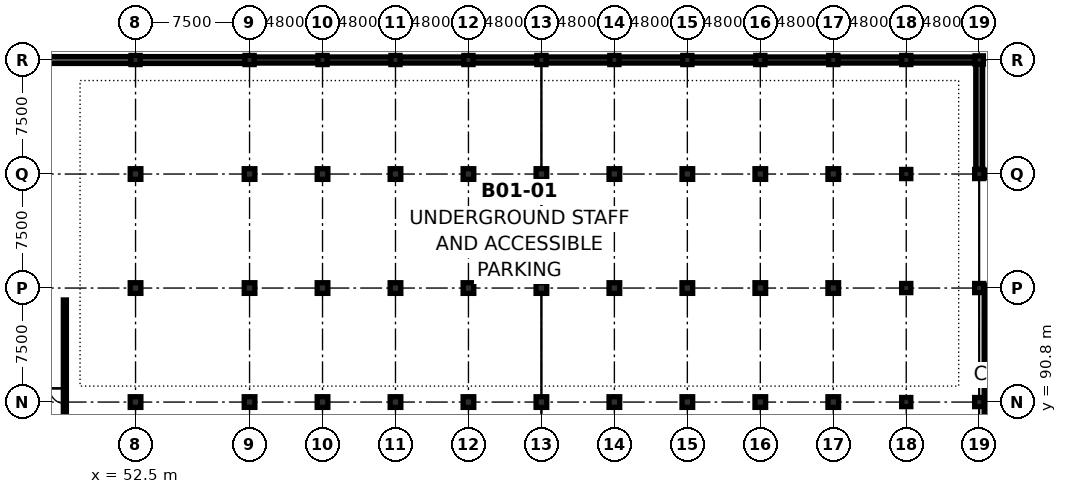
"""IFC4 building model, lengths in metres.
Left out: names, types, materials, properties, quantities, classifications, styles, units other than length and angle.
Written with IfcOpenShell. Run it as: python <this file> out.ifc"""

import sys

from ifc_helpers import new_model, si_unit, direction, frame, frame_2d, origin, origin_2d, place, context, subcontext, project, spatial, rectangle, extrude, element, fill, save


model = new_model("IFC4")
c1 = context("Model", 3, precision=1e-05, world=origin(), true_north=direction((0.0, 1.0)))
c2 = subcontext(c1, "Body", "Model", "MODEL_VIEW")
j1 = project(units=[si_unit("LENGTHUNIT", "METRE"), si_unit("PLANEANGLEUNIT", "RADIAN")], contexts=[c1])
p1 = place(None, origin())
s1 = spatial("IfcSite", under=j1, at=p1, CompositionType="ELEMENT")
p2 = place(p1, origin())
s2 = spatial("IfcBuilding", under=s1, at=p2, CompositionType="ELEMENT")
p3 = place(p2, frame((0.0, 0.0, -4.2)))
s3 = spatial("IfcBuildingStorey", under=s2, at=p3, CompositionType="ELEMENT", Elevation=-4.2)
for number, where, z_axis, x_axis in (
    (1, (52.5, 90.8, 0.0), (0.0, 0.0, 1.0), (1.0, 0.0, 0.0)),
    (2, (52.5, 98.3, 0.0), (0.0, 0.0, 1.0), (1.0, 0.0, 0.0)),
    (3, (52.5, 105.8, 0.0), (0.0, 0.0, 1.0), (1.0, 0.0, 0.0)),
):
    element("IfcColumn", number, at=place(p3, frame(where, z_axis=z_axis, x_axis=x_axis)), inside=s3, PredefinedType="COLUMN", context=c2, shape_type="SweptSolid", body=[
        extrude(rectangle(XDim=0.7, YDim=0.7, at=origin_2d()), origin(), (0.0, 0.0, 1.0), 3.78),
    ])
p4 = place(p3, frame((52.5, 113.3, 0.0), z_axis=(0.0, 0.0, 1.0), x_axis=(1.0, 0.0, 0.0)))
e4 = element("IfcColumn", 4, at=p4, inside=s3, PredefinedType="COLUMN", context=c2, shape_type="SweptSolid", body=[
    extrude(rectangle(XDim=0.6, YDim=0.6, at=origin_2d()), origin(), (0.0, 0.0, 1.0), 3.78),
])
for number, where, z_axis, x_axis in (
    (5, (60.0, 90.8, 0.0), (0.0, 0.0, 1.0), (1.0, 0.0, 0.0)),
    (6, (60.0, 98.3, 0.0), (0.0, 0.0, 1.0), (1.0, 0.0, 0.0)),
    (7, (60.0, 105.8, 0.0), (0.0, 0.0, 1.0), (1.0, 0.0, 0.0)),
):
    element("IfcColumn", number, at=place(p3, frame(where, z_axis=z_axis, x_axis=x_axis)), inside=s3, PredefinedType="COLUMN", context=c2, shape_type="SweptSolid", body=[
        extrude(rectangle(XDim=0.7, YDim=0.7, at=origin_2d()), origin(), (0.0, 0.0, 1.0), 3.78),
    ])
p5 = place(p3, frame((60.0, 113.3, 0.0), z_axis=(0.0, 0.0, 1.0), x_axis=(1.0, 0.0, 0.0)))
e8 = element("IfcColumn", 8, at=p5, inside=s3, PredefinedType="COLUMN", context=c2, shape_type="SweptSolid", body=[
    extrude(rectangle(XDim=0.6, YDim=0.6, at=origin_2d()), origin(), (0.0, 0.0, 1.0), 3.78),
])
for number, where, z_axis, x_axis in (
    (9, (64.8, 90.8, 0.0), (0.0, 0.0, 1.0), (1.0, 0.0, 0.0)),
    (10, (64.8, 98.3, 0.0), (0.0, 0.0, 1.0), (1.0, 0.0, 0.0)),
    (11, (64.8, 105.8, 0.0), (0.0, 0.0, 1.0), (1.0, 0.0, 0.0)),
):
    element("IfcColumn", number, at=place(p3, frame(where, z_axis=z_axis, x_axis=x_axis)), inside=s3, PredefinedType="COLUMN", context=c2, shape_type="SweptSolid", body=[
        extrude(rectangle(XDim=0.7, YDim=0.7, at=origin_2d()), origin(), (0.0, 0.0, 1.0), 3.78),
    ])
p6 = place(p3, frame((64.8, 113.3, 0.0), z_axis=(0.0, 0.0, 1.0), x_axis=(1.0, 0.0, 0.0)))
e12 = element("IfcColumn", 12, at=p6, inside=s3, PredefinedType="COLUMN", context=c2, shape_type="SweptSolid", body=[
    extrude(rectangle(XDim=0.6, YDim=0.6, at=origin_2d()), origin(), (0.0, 0.0, 1.0), 3.78),
])
for number, where, z_axis, x_axis in (
    (13, (69.6, 90.8, 0.0), (0.0, 0.0, 1.0), (1.0, 0.0, 0.0)),
    (14, (69.6, 98.3, 0.0), (0.0, 0.0, 1.0), (1.0, 0.0, 0.0)),
    (15, (69.6, 105.8, 0.0), (0.0, 0.0, 1.0), (1.0, 0.0, 0.0)),
):
    element("IfcColumn", number, at=place(p3, frame(where, z_axis=z_axis, x_axis=x_axis)), inside=s3, PredefinedType="COLUMN", context=c2, shape_type="SweptSolid", body=[
        extrude(rectangle(XDim=0.7, YDim=0.7, at=origin_2d()), origin(), (0.0, 0.0, 1.0), 3.78),
    ])
p7 = place(p3, frame((69.6, 113.3, 0.0), z_axis=(0.0, 0.0, 1.0), x_axis=(1.0, 0.0, 0.0)))
e16 = element("IfcColumn", 16, at=p7, inside=s3, PredefinedType="COLUMN", context=c2, shape_type="SweptSolid", body=[
    extrude(rectangle(XDim=0.6, YDim=0.6, at=origin_2d()), origin(), (0.0, 0.0, 1.0), 3.78),
])
for number, where, z_axis, x_axis in (
    (17, (74.4, 90.8, 0.0), (0.0, 0.0, 1.0), (1.0, 0.0, 0.0)),
    (18, (74.4, 98.3, 0.0), (0.0, 0.0, 1.0), (1.0, 0.0, 0.0)),
    (19, (74.4, 105.8, 0.0), (0.0, 0.0, 1.0), (1.0, 0.0, 0.0)),
):
    element("IfcColumn", number, at=place(p3, frame(where, z_axis=z_axis, x_axis=x_axis)), inside=s3, PredefinedType="COLUMN", context=c2, shape_type="SweptSolid", body=[
        extrude(rectangle(XDim=0.7, YDim=0.7, at=origin_2d()), origin(), (0.0, 0.0, 1.0), 3.78),
    ])
p8 = place(p3, frame((74.4, 113.3, 0.0), z_axis=(0.0, 0.0, 1.0), x_axis=(1.0, 0.0, 0.0)))
e20 = element("IfcColumn", 20, at=p8, inside=s3, PredefinedType="COLUMN", context=c2, shape_type="SweptSolid", body=[
    extrude(rectangle(XDim=0.6, YDim=0.6, at=origin_2d()), origin(), (0.0, 0.0, 1.0), 3.78),
])
for number, where, z_axis, x_axis in (
    (21, (79.2, 90.8, 0.0), (0.0, 0.0, 1.0), (1.0, 0.0, 0.0)),
    (22, (79.2, 98.3, 0.0), (0.0, 0.0, 1.0), (1.0, 0.0, 0.0)),
    (23, (79.2, 105.8, 0.0), (0.0, 0.0, 1.0), (1.0, 0.0, 0.0)),
):
    element("IfcColumn", number, at=place(p3, frame(where, z_axis=z_axis, x_axis=x_axis)), inside=s3, PredefinedType="COLUMN", context=c2, shape_type="SweptSolid", body=[
        extrude(rectangle(XDim=0.7, YDim=0.7, at=origin_2d()), origin(), (0.0, 0.0, 1.0), 3.78),
    ])
p9 = place(p3, frame((79.2, 113.3, 0.0), z_axis=(0.0, 0.0, 1.0), x_axis=(1.0, 0.0, 0.0)))
e24 = element("IfcColumn", 24, at=p9, inside=s3, PredefinedType="COLUMN", context=c2, shape_type="SweptSolid", body=[
    extrude(rectangle(XDim=0.6, YDim=0.6, at=origin_2d()), origin(), (0.0, 0.0, 1.0), 3.78),
])
for number, where, z_axis, x_axis in (
    (25, (84.0, 90.8, 0.0), (0.0, 0.0, 1.0), (1.0, 0.0, 0.0)),
    (26, (84.0, 98.3, 0.0), (0.0, 0.0, 1.0), (1.0, 0.0, 0.0)),
    (27, (84.0, 105.8, 0.0), (0.0, 0.0, 1.0), (1.0, 0.0, 0.0)),
):
    element("IfcColumn", number, at=place(p3, frame(where, z_axis=z_axis, x_axis=x_axis)), inside=s3, PredefinedType="COLUMN", context=c2, shape_type="SweptSolid", body=[
        extrude(rectangle(XDim=0.7, YDim=0.7, at=origin_2d()), origin(), (0.0, 0.0, 1.0), 3.78),
    ])
p10 = place(p3, frame((84.0, 113.3, 0.0), z_axis=(0.0, 0.0, 1.0), x_axis=(1.0, 0.0, 0.0)))
e28 = element("IfcColumn", 28, at=p10, inside=s3, PredefinedType="COLUMN", context=c2, shape_type="SweptSolid", body=[
    extrude(rectangle(XDim=0.6, YDim=0.6, at=origin_2d()), origin(), (0.0, 0.0, 1.0), 3.78),
])
for number, where, z_axis, x_axis in (
    (29, (88.8, 90.8, 0.0), (0.0, 0.0, 1.0), (1.0, 0.0, 0.0)),
    (30, (88.8, 98.3, 0.0), (0.0, 0.0, 1.0), (1.0, 0.0, 0.0)),
    (31, (88.8, 105.8, 0.0), (0.0, 0.0, 1.0), (1.0, 0.0, 0.0)),
):
    element("IfcColumn", number, at=place(p3, frame(where, z_axis=z_axis, x_axis=x_axis)), inside=s3, PredefinedType="COLUMN", context=c2, shape_type="SweptSolid", body=[
        extrude(rectangle(XDim=0.7, YDim=0.7, at=origin_2d()), origin(), (0.0, 0.0, 1.0), 3.78),
    ])
p11 = place(p3, frame((88.8, 113.3, 0.0), z_axis=(0.0, 0.0, 1.0), x_axis=(1.0, 0.0, 0.0)))
e32 = element("IfcColumn", 32, at=p11, inside=s3, PredefinedType="COLUMN", context=c2, shape_type="SweptSolid", body=[
    extrude(rectangle(XDim=0.6, YDim=0.6, at=origin_2d()), origin(), (0.0, 0.0, 1.0), 3.78),
])
for number, where, z_axis, x_axis in (
    (33, (93.6, 90.8, 0.0), (0.0, 0.0, 1.0), (1.0, 0.0, 0.0)),
    (34, (93.6, 98.3, 0.0), (0.0, 0.0, 1.0), (1.0, 0.0, 0.0)),
    (35, (93.6, 105.8, 0.0), (0.0, 0.0, 1.0), (1.0, 0.0, 0.0)),
):
    element("IfcColumn", number, at=place(p3, frame(where, z_axis=z_axis, x_axis=x_axis)), inside=s3, PredefinedType="COLUMN", context=c2, shape_type="SweptSolid", body=[
        extrude(rectangle(XDim=0.7, YDim=0.7, at=origin_2d()), origin(), (0.0, 0.0, 1.0), 3.78),
    ])
p12 = place(p3, frame((93.6, 113.3, 0.0), z_axis=(0.0, 0.0, 1.0), x_axis=(1.0, 0.0, 0.0)))
e36 = element("IfcColumn", 36, at=p12, inside=s3, PredefinedType="COLUMN", context=c2, shape_type="SweptSolid", body=[
    extrude(rectangle(XDim=0.6, YDim=0.6, at=origin_2d()), origin(), (0.0, 0.0, 1.0), 3.78),
])
for number, where, z_axis, x_axis in (
    (37, (98.4, 90.8, 0.0), (0.0, 0.0, 1.0), (1.0, 0.0, 0.0)),
    (38, (98.4, 98.3, 0.0), (0.0, 0.0, 1.0), (1.0, 0.0, 0.0)),
    (39, (98.4, 105.8, 0.0), (0.0, 0.0, 1.0), (1.0, 0.0, 0.0)),
):
    element("IfcColumn", number, at=place(p3, frame(where, z_axis=z_axis, x_axis=x_axis)), inside=s3, PredefinedType="COLUMN", context=c2, shape_type="SweptSolid", body=[
        extrude(rectangle(XDim=0.7, YDim=0.7, at=origin_2d()), origin(), (0.0, 0.0, 1.0), 3.78),
    ])
for number, where, z_axis, x_axis in (
    (40, (98.4, 113.3, 0.0), (0.0, 0.0, 1.0), (1.0, 0.0, 0.0)),
    (41, (103.2, 90.8, 0.0), (0.0, 0.0, 1.0), (1.0, 0.0, 0.0)),
    (42, (103.2, 98.3, 0.0), (0.0, 0.0, 1.0), (1.0, 0.0, 0.0)),
    (43, (103.2, 105.8, 0.0), (0.0, 0.0, 1.0), (1.0, 0.0, 0.0)),
    (44, (103.2, 113.3, 0.0), (0.0, 0.0, 1.0), (1.0, 0.0, 0.0)),
    (45, (108.0, 90.8, 0.0), (0.0, 0.0, 1.0), (1.0, 0.0, 0.0)),
    (46, (108.0, 98.3, 0.0), (0.0, 0.0, 1.0), (1.0, 0.0, 0.0)),
    (47, (108.0, 105.8, 0.0), (0.0, 0.0, 1.0), (1.0, 0.0, 0.0)),
):
    element("IfcColumn", number, at=place(p3, frame(where, z_axis=z_axis, x_axis=x_axis)), inside=s3, PredefinedType="COLUMN", context=c2, shape_type="SweptSolid", body=[
        extrude(rectangle(XDim=0.6, YDim=0.6, at=origin_2d()), origin(), (0.0, 0.0, 1.0), 3.78),
    ])
p13 = place(p3, frame((108.0, 113.3, 0.0), z_axis=(0.0, 0.0, 1.0), x_axis=(1.0, 0.0, 0.0)))
e48 = element("IfcColumn", 48, at=p13, inside=s3, PredefinedType="COLUMN", context=c2, shape_type="SweptSolid", body=[
    extrude(rectangle(XDim=0.55, YDim=0.55, at=origin_2d()), origin(), (0.0, 0.0, 1.0), 3.78),
])
for number, where, z_axis, x_axis in (
    (49, (45.31, 113.3, 0.0), (0.0, 0.0, 1.0), (1.0, 0.0, 0.0)),
    (50, (52.81, 113.3, 0.0), (0.0, 0.0, 1.0), (1.0, 0.0, 0.0)),
):
    element("IfcWall", number, at=place(p3, frame(where, z_axis=z_axis, x_axis=x_axis)), inside=s3, PredefinedType="USERDEFINED", context=c2, shape_type="SweptSolid", body=[
        extrude(rectangle(XDim=6.88, YDim=0.45, at=frame_2d((3.44, 0.0))), origin(), (0.0, 0.0, 1.0), 3.13),
    ])
for number, where, z_axis, x_axis in (
    (51, (60.31, 113.3, 0.0), (0.0, 0.0, 1.0), (1.0, 0.0, 0.0)),
    (52, (65.11, 113.3, 0.0), (0.0, 0.0, 1.0), (1.0, 0.0, 0.0)),
):
    element("IfcWall", number, at=place(p3, frame(where, z_axis=z_axis, x_axis=x_axis)), inside=s3, PredefinedType="USERDEFINED", context=c2, shape_type="SweptSolid", body=[
        extrude(rectangle(XDim=4.18, YDim=0.4, at=frame_2d((2.09, 0.0))), origin(), (0.0, 0.0, 1.0), 3.13),
    ])
p14 = place(p3, frame((69.91, 113.3, 0.0), z_axis=(0.0, 0.0, 1.0), x_axis=(1.0, 0.0, 0.0)))
e53 = element("IfcWall", 53, at=p14, inside=s3, PredefinedType="USERDEFINED", context=c2, shape_type="SweptSolid", body=[
    extrude(rectangle(XDim=4.18, YDim=0.4, at=frame_2d((2.09, 0.0))), origin(), (0.0, 0.0, 1.0), 3.13),
])
for number, where, z_axis, x_axis in (
    (54, (74.71, 113.3, 0.0), (0.0, 0.0, 1.0), (1.0, 0.0, 0.0)),
    (55, (79.51, 113.3, 0.0), (0.0, 0.0, 1.0), (1.0, 0.0, 0.0)),
    (56, (84.31, 113.3, 0.0), (0.0, 0.0, 1.0), (1.0, 0.0, 0.0)),
    (57, (89.11, 113.3, 0.0), (0.0, 0.0, 1.0), (1.0, 0.0, 0.0)),
):
    element("IfcWall", number, at=place(p3, frame(where, z_axis=z_axis, x_axis=x_axis)), inside=s3, PredefinedType="USERDEFINED", context=c2, shape_type="SweptSolid", body=[
        extrude(rectangle(XDim=4.18, YDim=0.4, at=frame_2d((2.09, 0.0))), origin(), (0.0, 0.0, 1.0), 3.13),
    ])
p15 = place(p3, frame((93.91, 113.3, 0.0), z_axis=(0.0, 0.0, 1.0), x_axis=(1.0, 0.0, 0.0)))
e58 = element("IfcWall", 58, at=p15, inside=s3, PredefinedType="USERDEFINED", context=c2, shape_type="SweptSolid", body=[
    extrude(rectangle(XDim=4.18, YDim=0.4, at=frame_2d((2.09, 0.0))), origin(), (0.0, 0.0, 1.0), 3.13),
])
p16 = place(p3, frame((98.71, 113.3, 0.0), z_axis=(0.0, 0.0, 1.0), x_axis=(1.0, 0.0, 0.0)))
e59 = element("IfcWall", 59, at=p16, inside=s3, PredefinedType="USERDEFINED", context=c2, shape_type="SweptSolid", body=[
    extrude(rectangle(XDim=4.18, YDim=0.4, at=frame_2d((2.09, 0.0))), origin(), (0.0, 0.0, 1.0), 3.13),
])
p17 = place(p3, frame((103.51, 113.3, 0.0), z_axis=(0.0, 0.0, 1.0), x_axis=(1.0, 0.0, 0.0)))
e60 = element("IfcWall", 60, at=p17, inside=s3, PredefinedType="USERDEFINED", context=c2, shape_type="SweptSolid", body=[
    extrude(rectangle(XDim=4.205, YDim=0.4, at=frame_2d((2.103, 0.0))), origin(), (0.0, 0.0, 1.0), 3.13),
])
p18 = place(p3, frame((108.0, 113.015, 0.0), z_axis=(0.0, 0.0, 1.0), x_axis=(0.0, -1.0, 0.0)))
e61 = element("IfcWall", 61, at=p18, inside=s3, PredefinedType="USERDEFINED", context=c2, shape_type="SweptSolid", body=[
    extrude(rectangle(XDim=6.905, YDim=0.45, at=frame_2d((3.452, 0.0))), origin(), (0.0, 0.0, 1.0), 3.08),
])
p19 = place(p3, frame((108.31, 105.8, 0.0), z_axis=(0.0, 0.0, 1.0), x_axis=(1.0, 0.0, 0.0)))
e62 = element("IfcWall", 62, at=p19, inside=s3, PredefinedType="USERDEFINED", context=c2, shape_type="SweptSolid", body=[
    extrude(rectangle(XDim=7.38, YDim=0.45, at=frame_2d((3.69, 0.0))), origin(), (0.0, 0.0, 1.0), 2.95),
])
p20 = place(p3, frame((47.85, 84.885, 0.0), z_axis=(0.0, 0.0, 1.0), x_axis=(0.0, 1.0, 0.0)))
e63 = element("IfcWall", 63, at=p20, inside=s3, PredefinedType="PARTITIONING", context=c2, shape_type="SweptSolid", body=[
    extrude(rectangle(XDim=12.63, YDim=0.2, at=frame_2d((6.315, 0.0))), origin(), (0.0, 0.0, 1.0), 3.065),
])
p21 = place(p20, frame((5.815, 0.0, 0.0)))
e64 = element("IfcOpeningElement", 64, at=p21, cuts=e63, PredefinedType="OPENING", context=c2, shape_type="SweptSolid", body=[
    extrude(rectangle(XDim=1.0, YDim=2.15, at=frame_2d((0.5, 1.075))), frame((0.0, 0.112, 0.0), z_axis=(0.0, -1.0, 0.0), x_axis=(1.0, 0.0, 0.0)), (0.0, 0.0, 1.0), 0.224),
])
p22 = place(p3, frame((108.312, 98.4, 0.0), z_axis=(0.0, 0.0, 1.0), x_axis=(1.0, 0.0, 0.0)))
e65 = element("IfcWall", 65, at=p22, inside=s3, PredefinedType="PARTITIONING", context=c2, shape_type="SweptSolid", body=[
    extrude(rectangle(XDim=10.003, YDim=0.16, at=frame_2d((5.001, 0.0))), origin(), (0.0, 0.0, 1.0), 2.935),
])
p23 = place(p3, frame((108.4, 85.965, 0.0), z_axis=(0.0, 0.0, 1.0), x_axis=(0.0, 1.0, 0.0)))
e66 = element("IfcWall", 66, at=p23, inside=s3, PredefinedType="PARTITIONING", context=c2, shape_type="SweptSolid", body=[
    extrude(rectangle(XDim=12.343, YDim=0.15, at=frame_2d((6.171, 0.0))), origin(), (0.0, 0.0, 1.0), 2.935),
])
p24 = place(p21, origin())
e67 = element("IfcDoor", 67, at=p24, inside=s3, OperationType="SINGLE_SWING_RIGHT", PredefinedType="DOOR", context=c2, shape_type="SweptSolid", body=[
    extrude(rectangle(XDim=1.0, YDim=2.15, at=frame_2d((0.5, 1.075))), frame((0.0, 0.025, 0.0), z_axis=(0.0, -1.0, 0.0), x_axis=(1.0, 0.0, 0.0)), (0.0, 0.0, 1.0), 0.05),
])
fill(e64, e67)
save(model, sys.argv[1])
